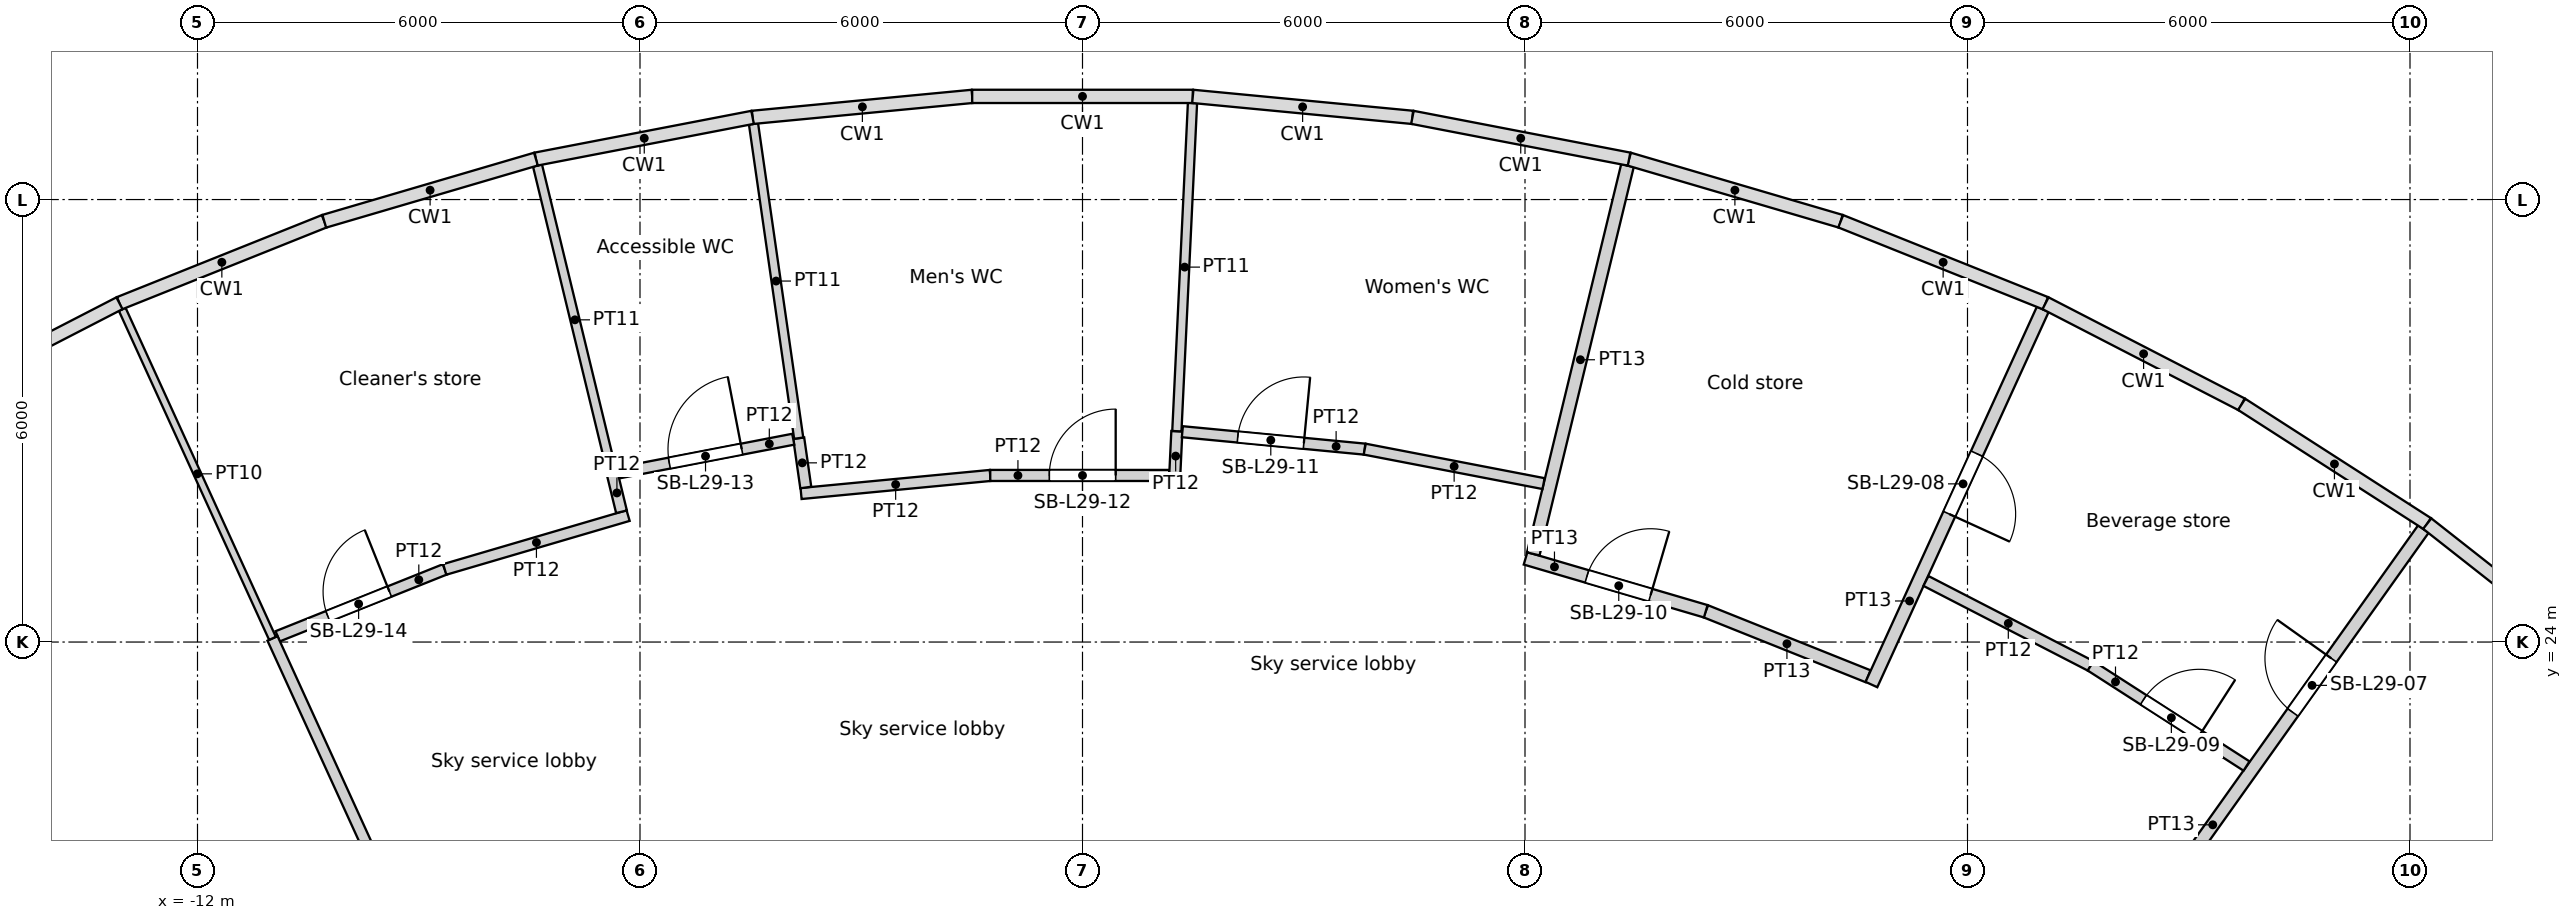
"""IFC4 building model, lengths in metres.
Left out: names, types, materials, properties, quantities, classifications, styles, units other than length and angle.
Written with IfcOpenShell. Run it as: python <this file> out.ifc"""

import sys

from ifc_helpers import new_model, si_unit, direction, frame, frame_2d, origin, origin_2d, place, context, subcontext, project, spatial, rectangle, circle, extrude, element, fill, save


model = new_model("IFC4")
c1 = context("Model", 3, precision=1e-05, world=origin(), true_north=direction((0.0, 1.0)))
c2 = subcontext(c1, "Body", "Model", "MODEL_VIEW")
j1 = project(units=[si_unit("LENGTHUNIT", "METRE"), si_unit("PLANEANGLEUNIT", "RADIAN")], contexts=[c1])
p1 = place(None, origin())
s1 = spatial("IfcSite", under=j1, at=p1, CompositionType="ELEMENT")
p2 = place(p1, origin())
s2 = spatial("IfcBuilding", under=s1, at=p2, CompositionType="ELEMENT")
p3 = place(p2, frame((0.0, 0.0, 114.6)))
s3 = spatial("IfcBuildingStorey", under=s2, at=p3, CompositionType="ELEMENT", Elevation=114.6)
for number, where, z_axis, x_axis in (
    (1, (17.561, 24.661, 0.0), (0.0, 0.0, 1.0), (1.0, 0.0, 0.0)),
    (2, (12.576, 27.539, 0.0), (0.0, 0.0, 1.0), (1.0, 0.0, 0.0)),
    (3, (7.137, 29.421, 0.0), (0.0, 0.0, 1.0), (1.0, 0.0, 0.0)),
    (4, (1.44, 30.24, 0.0), (0.0, 0.0, 1.0), (1.0, 0.0, 0.0)),
    (5, (-4.309, 29.966, 0.0), (0.0, 0.0, 1.0), (1.0, 0.0, 0.0)),
    (6, (-9.902, 28.61, 0.0), (0.0, 0.0, 1.0), (1.0, 0.0, 0.0)),
):
    element("IfcColumn", number, at=place(p3, frame(where, z_axis=z_axis, x_axis=x_axis)), inside=s3, PredefinedType="COLUMN", context=c2, shape_type="SweptSolid", body=[
        extrude(circle(Radius=0.6, at=origin_2d()), origin(), (0.0, 0.0, 1.0), 5.4),
    ])
for number, where, z_axis, x_axis in (
    (7, (9.723, 22.54, 0.0), (0.0, 0.0, 1.0), (1.0, 0.0, 0.0)),
    (8, (4.263, 24.175, 0.0), (0.0, 0.0, 1.0), (1.0, 0.0, 0.0)),
    (9, (-1.427, 24.506, 0.0), (0.0, 0.0, 1.0), (1.0, 0.0, 0.0)),
    (10, (-7.04, 23.516, 0.0), (0.0, 0.0, 1.0), (1.0, 0.0, 0.0)),
    (11, (-12.274, 21.259, 0.0), (0.0, 0.0, 1.0), (1.0, 0.0, 0.0)),
):
    element("IfcColumn", number, at=place(p3, frame(where, z_axis=z_axis, x_axis=x_axis)), inside=s3, PredefinedType="COLUMN", context=c2, shape_type="SweptSolid", body=[
        extrude(circle(Radius=0.65, at=origin_2d()), origin(), (0.0, 0.0, 1.0), 5.4),
    ])
p4 = place(p3, frame((-13.021, 28.512, 0.0), z_axis=(0.0, 0.0, 1.0), x_axis=(0.415403363215, -0.909637315544, 0.0)))
e12 = element("IfcWall", 12, at=p4, inside=s3, PredefinedType="PARTITIONING", context=c2, shape_type="SweptSolid", body=[
    extrude(rectangle(XDim=4.906, YDim=0.1, at=frame_2d((2.453, 0.0))), origin(), (0.0, 0.0, 1.0), 4.0),
])
p5 = place(p3, frame((-10.983, 24.05, 0.0), z_axis=(0.0, 0.0, 1.0), x_axis=(0.415416845748, -0.909631158365, 0.0)))
e13 = element("IfcWall", 13, at=p5, inside=s3, PredefinedType="PARTITIONING", context=c2, shape_type="SweptSolid", body=[
    extrude(rectangle(XDim=12.065, YDim=0.15, at=frame_2d((6.032, 0.0))), origin(), (0.0, 0.0, 1.0), 4.0),
])
p6 = place(p3, frame((-10.913, 24.077, 0.0), z_axis=(0.0, 0.0, 1.0), x_axis=(0.928366285294, 0.371666571445, 0.0)))
e14 = element("IfcWall", 14, at=p6, inside=s3, PredefinedType="PARTITIONING", context=c2, shape_type="SweptSolid", body=[
    extrude(rectangle(XDim=2.441, YDim=0.15, at=frame_2d((1.22, 0.0))), origin(), (0.0, 0.0, 1.0), 4.0),
])
p7 = place(p6, frame((0.733, 0.0, 0.0)))
e15 = element("IfcOpeningElement", 15, at=p7, cuts=e14, PredefinedType="OPENING", context=c2, shape_type="SweptSolid", body=[
    extrude(rectangle(XDim=0.9, YDim=2.1, at=frame_2d((0.45, 1.05))), frame((0.0, 0.075, 0.0), z_axis=(0.0, -1.0, 0.0), x_axis=(1.0, 0.0, 0.0)), (0.0, 0.0, 1.0), 0.15),
])
p8 = place(p3, frame((-7.39, 30.461, 0.0), z_axis=(0.0, 0.0, 1.0), x_axis=(0.235763969247, -0.971810347138, 0.0)))
e16 = element("IfcWall", 16, at=p8, inside=s3, PredefinedType="PARTITIONING", context=c2, shape_type="SweptSolid", body=[
    extrude(rectangle(XDim=4.305, YDim=0.125, at=frame_2d((2.152, 0.0))), origin(), (0.0, 0.0, 1.0), 4.0),
])
p9 = place(p3, frame((-6.375, 26.277, 0.0), z_axis=(0.0, 0.0, 1.0), x_axis=(0.235533543779, -0.971866220091, 0.0)))
e17 = element("IfcWall", 17, at=p9, inside=s3, PredefinedType="PARTITIONING", context=c2, shape_type="SweptSolid", body=[
    extrude(rectangle(XDim=0.526, YDim=0.15, at=frame_2d((0.263, 0.0))), origin(), (0.0, 0.0, 1.0), 4.0),
])
p10 = place(p3, frame((-6.161, 25.715, 0.0), z_axis=(0.0, 0.0, 1.0), x_axis=(-0.959492937384, -0.28173268023, 0.0)))
e18 = element("IfcWall", 18, at=p10, inside=s3, PredefinedType="PARTITIONING", context=c2, shape_type="SweptSolid", body=[
    extrude(rectangle(XDim=2.591, YDim=0.15, at=frame_2d((1.295, 0.0))), origin(), (0.0, 0.0, 1.0), 4.0),
])
p11 = place(p3, frame((-4.461, 31.025, 0.0), z_axis=(0.0, 0.0, 1.0), x_axis=(0.142294692294, -0.989824338226, 0.0)))
e19 = element("IfcWall", 19, at=p11, inside=s3, PredefinedType="PARTITIONING", context=c2, shape_type="SweptSolid", body=[
    extrude(rectangle(XDim=4.305, YDim=0.125, at=frame_2d((2.152, 0.0))), origin(), (0.0, 0.0, 1.0), 4.0),
])
p12 = place(p3, frame((-6.301, 26.292, 0.0), z_axis=(0.0, 0.0, 1.0), x_axis=(0.981932344741, 0.189232318463, 0.0)))
e20 = element("IfcWall", 20, at=p12, inside=s3, PredefinedType="PARTITIONING", context=c2, shape_type="SweptSolid", body=[
    extrude(rectangle(XDim=2.423, YDim=0.15, at=frame_2d((1.211, 0.0))), origin(), (0.0, 0.0, 1.0), 4.0),
])
p13 = place(p12, frame((0.711, 0.0, 0.0)))
e21 = element("IfcOpeningElement", 21, at=p13, cuts=e20, PredefinedType="OPENING", context=c2, shape_type="SweptSolid", body=[
    extrude(rectangle(XDim=1.0, YDim=2.1, at=frame_2d((0.5, 1.05))), frame((0.0, 0.075, 0.0), z_axis=(0.0, -1.0, 0.0), x_axis=(1.0, 0.0, 0.0)), (0.0, 0.0, 1.0), 0.15),
])
p14 = place(p3, frame((-3.848, 26.764, 0.0), z_axis=(0.0, 0.0, 1.0), x_axis=(0.142280765431, -0.989826340218, 0.0)))
e22 = element("IfcWall", 22, at=p14, inside=s3, PredefinedType="PARTITIONING", context=c2, shape_type="SweptSolid", body=[
    extrude(rectangle(XDim=0.676, YDim=0.15, at=frame_2d((0.338, 0.0))), origin(), (0.0, 0.0, 1.0), 4.0),
])
p15 = place(p3, frame((-1.251, 26.259, 0.0), z_axis=(0.0, 0.0, 1.0), x_axis=(-0.995473727837, -0.095037135829, 0.0)))
e23 = element("IfcWall", 23, at=p15, inside=s3, PredefinedType="PARTITIONING", context=c2, shape_type="SweptSolid", body=[
    extrude(rectangle(XDim=2.577, YDim=0.15, at=frame_2d((1.288, 0.0))), origin(), (0.0, 0.0, 1.0), 4.0),
])
p16 = place(p3, frame((-1.251, 26.259, 0.0), z_axis=(0.0, 0.0, 1.0), x_axis=(1.0, 0.0, 0.0)))
e24 = element("IfcWall", 24, at=p16, inside=s3, PredefinedType="PARTITIONING", context=c2, shape_type="SweptSolid", body=[
    extrude(rectangle(XDim=2.427, YDim=0.15, at=frame_2d((1.213, 0.0))), origin(), (0.0, 0.0, 1.0), 4.0),
])
p17 = place(p16, frame((0.801, 0.0, 0.0)))
e25 = element("IfcOpeningElement", 25, at=p17, cuts=e24, PredefinedType="OPENING", context=c2, shape_type="SweptSolid", body=[
    extrude(rectangle(XDim=0.9, YDim=2.1, at=frame_2d((0.45, 1.05))), frame((0.0, 0.075, 0.0), z_axis=(0.0, -1.0, 0.0), x_axis=(1.0, 0.0, 0.0)), (0.0, 0.0, 1.0), 0.15),
])
p18 = place(p3, frame((1.279, 26.859, 0.0), z_axis=(0.0, 0.0, 1.0), x_axis=(-0.047341937476, -0.998878741868, 0.0)))
e26 = element("IfcWall", 26, at=p18, inside=s3, PredefinedType="PARTITIONING", context=c2, shape_type="SweptSolid", body=[
    extrude(rectangle(XDim=0.676, YDim=0.15, at=frame_2d((0.338, 0.0))), origin(), (0.0, 0.0, 1.0), 4.0),
])
p19 = place(p3, frame((1.491, 31.309, 0.0), z_axis=(0.0, 0.0, 1.0), x_axis=(-0.047622430455, -0.99886540841, 0.0)))
e27 = element("IfcWall", 27, at=p19, inside=s3, PredefinedType="PARTITIONING", context=c2, shape_type="SweptSolid", body=[
    extrude(rectangle(XDim=4.455, YDim=0.125, at=frame_2d((2.228, 0.0))), origin(), (0.0, 0.0, 1.0), 4.0),
])
p20 = place(p3, frame((1.354, 26.852, 0.0), z_axis=(0.0, 0.0, 1.0), x_axis=(0.995473803063, -0.095036347869, 0.0)))
e28 = element("IfcWall", 28, at=p20, inside=s3, PredefinedType="PARTITIONING", context=c2, shape_type="SweptSolid", body=[
    extrude(rectangle(XDim=2.484, YDim=0.15, at=frame_2d((1.242, 0.0))), origin(), (0.0, 0.0, 1.0), 4.0),
])
p21 = place(p20, frame((0.754, 0.0, 0.0)))
e29 = element("IfcOpeningElement", 29, at=p21, cuts=e28, PredefinedType="OPENING", context=c2, shape_type="SweptSolid", body=[
    extrude(rectangle(XDim=0.9, YDim=2.1, at=frame_2d((0.45, 1.05))), frame((0.0, 0.075, 0.0), z_axis=(0.0, -1.0, 0.0), x_axis=(1.0, 0.0, 0.0)), (0.0, 0.0, 1.0), 0.15),
])
p22 = place(p3, frame((6.252, 26.148, 0.0), z_axis=(0.0, 0.0, 1.0), x_axis=(-0.981914660197, 0.189324061043, 0.0)))
e30 = element("IfcWall", 30, at=p22, inside=s3, PredefinedType="PARTITIONING", context=c2, shape_type="SweptSolid", body=[
    extrude(rectangle(XDim=2.469, YDim=0.15, at=frame_2d((1.235, 0.0))), origin(), (0.0, 0.0, 1.0), 4.0),
])
p23 = place(p3, frame((7.39, 30.461, 0.0), z_axis=(0.0, 0.0, 1.0), x_axis=(-0.235734136945, -0.971817584055, 0.0)))
e31 = element("IfcWall", 31, at=p23, inside=s3, PredefinedType="PARTITIONING", context=c2, shape_type="SweptSolid", body=[
    extrude(rectangle(XDim=5.418, YDim=0.175, at=frame_2d((2.709, 0.0))), origin(), (0.0, 0.0, 1.0), 4.0),
])
p24 = place(p3, frame((6.008, 25.135, 0.0), z_axis=(0.0, 0.0, 1.0), x_axis=(0.959475355364, -0.281792552155, 0.0)))
e32 = element("IfcWall", 32, at=p24, inside=s3, PredefinedType="PARTITIONING", context=c2, shape_type="SweptSolid", body=[
    extrude(rectangle(XDim=2.546, YDim=0.175, at=frame_2d((1.273, 0.0))), origin(), (0.0, 0.0, 1.0), 4.0),
])
p25 = place(p24, frame((0.867, 0.0, 0.0)))
e33 = element("IfcOpeningElement", 33, at=p25, cuts=e32, PredefinedType="OPENING", context=c2, shape_type="SweptSolid", body=[
    extrude(rectangle(XDim=0.9, YDim=2.1, at=frame_2d((0.45, 1.05))), frame((0.0, 0.087, 0.0), z_axis=(0.0, -1.0, 0.0), x_axis=(1.0, 0.0, 0.0)), (0.0, 0.0, 1.0), 0.175),
])
p26 = place(p3, frame((10.652, 23.536, 0.0), z_axis=(0.0, 0.0, 1.0), x_axis=(-0.928377260399, 0.371639156137, 0.0)))
e34 = element("IfcWall", 34, at=p26, inside=s3, PredefinedType="PARTITIONING", context=c2, shape_type="SweptSolid", body=[
    extrude(rectangle(XDim=2.372, YDim=0.175, at=frame_2d((1.186, 0.0))), origin(), (0.0, 0.0, 1.0), 4.0),
])
p27 = place(p3, frame((10.697, 23.424, 0.0), z_axis=(0.0, 0.0, 1.0), x_axis=(0.415406978867, 0.909635664378, 0.0)))
e35 = element("IfcWall", 35, at=p27, inside=s3, PredefinedType="PARTITIONING", context=c2, shape_type="SweptSolid", body=[
    extrude(rectangle(XDim=5.594, YDim=0.175, at=frame_2d((2.797, 0.0))), origin(), (0.0, 0.0, 1.0), 4.0),
])
p28 = place(p27, frame((2.542, 0.0, 0.0)))
e36 = element("IfcOpeningElement", 36, at=p28, cuts=e35, PredefinedType="OPENING", context=c2, shape_type="SweptSolid", body=[
    extrude(rectangle(XDim=0.9, YDim=2.1, at=frame_2d((0.45, 1.05))), frame((0.0, 0.087, 0.0), z_axis=(0.0, -1.0, 0.0), x_axis=(1.0, 0.0, 0.0)), (0.0, 0.0, 1.0), 0.175),
])
p29 = place(p3, frame((13.67, 23.677, 0.0), z_axis=(0.0, 0.0, 1.0), x_axis=(-0.8888594416, 0.458179978916, 0.0)))
e37 = element("IfcWall", 37, at=p29, inside=s3, PredefinedType="PARTITIONING", context=c2, shape_type="SweptSolid", body=[
    extrude(rectangle(XDim=2.512, YDim=0.15, at=frame_2d((1.256, 0.0))), origin(), (0.0, 0.0, 1.0), 4.0),
])
p30 = place(p3, frame((13.67, 23.677, 0.0), z_axis=(0.0, 0.0, 1.0), x_axis=(0.841232144756, -0.540674096503, 0.0)))
e38 = element("IfcWall", 38, at=p30, inside=s3, PredefinedType="PARTITIONING", context=c2, shape_type="SweptSolid", body=[
    extrude(rectangle(XDim=2.512, YDim=0.15, at=frame_2d((1.256, 0.0))), origin(), (0.0, 0.0, 1.0), 4.0),
])
p31 = place(p30, frame((0.851, 0.0, 0.0)))
e39 = element("IfcOpeningElement", 39, at=p31, cuts=e38, PredefinedType="OPENING", context=c2, shape_type="SweptSolid", body=[
    extrude(rectangle(XDim=0.9, YDim=2.1, at=frame_2d((0.45, 1.05))), frame((0.0, 0.075, 0.0), z_axis=(0.0, -1.0, 0.0), x_axis=(1.0, 0.0, 0.0)), (0.0, 0.0, 1.0), 0.15),
])
p32 = place(p3, frame((14.269, 20.038, 0.0), z_axis=(0.0, 0.0, 1.0), x_axis=(0.580039185879, 0.814588572744, 0.0)))
e40 = element("IfcWall", 40, at=p32, inside=s3, PredefinedType="PARTITIONING", context=c2, shape_type="SweptSolid", body=[
    extrude(rectangle(XDim=6.745, YDim=0.175, at=frame_2d((3.373, 0.0))), origin(), (0.0, 0.0, 1.0), 4.0),
])
p33 = place(p32, frame((3.693, 0.0, 0.0)))
e41 = element("IfcOpeningElement", 41, at=p33, cuts=e40, PredefinedType="OPENING", context=c2, shape_type="SweptSolid", body=[
    extrude(rectangle(XDim=0.9, YDim=2.1, at=frame_2d((0.45, 1.05))), frame((0.0, 0.087, 0.0), z_axis=(0.0, -1.0, 0.0), x_axis=(1.0, 0.0, 0.0)), (0.0, 0.0, 1.0), 0.175),
])
p34 = place(p33, origin())
e42 = element("IfcDoor", 42, at=p34, inside=s3, OperationType="SINGLE_SWING_RIGHT", PredefinedType="DOOR", context=c2, shape_type="SweptSolid", body=[
    extrude(rectangle(XDim=0.9, YDim=2.1, at=frame_2d((0.45, 1.05))), frame((0.0, 0.025, 0.0), z_axis=(0.0, -1.0, 0.0), x_axis=(1.0, 0.0, 0.0)), (0.0, 0.0, 1.0), 0.05),
])
fill(e41, e42)
p35 = place(p28, origin())
e43 = element("IfcDoor", 43, at=p35, inside=s3, OperationType="SINGLE_SWING_RIGHT", PredefinedType="DOOR", context=c2, shape_type="SweptSolid", body=[
    extrude(rectangle(XDim=0.9, YDim=2.1, at=frame_2d((0.45, 1.05))), frame((0.0, 0.025, 0.0), z_axis=(0.0, -1.0, 0.0), x_axis=(1.0, 0.0, 0.0)), (0.0, 0.0, 1.0), 0.05),
])
fill(e36, e43)
p36 = place(p31, origin())
e44 = element("IfcDoor", 44, at=p36, inside=s3, OperationType="SINGLE_SWING_RIGHT", PredefinedType="DOOR", context=c2, shape_type="SweptSolid", body=[
    extrude(rectangle(XDim=0.9, YDim=2.1, at=frame_2d((0.45, 1.05))), frame((0.0, 0.025, 0.0), z_axis=(0.0, -1.0, 0.0), x_axis=(1.0, 0.0, 0.0)), (0.0, 0.0, 1.0), 0.05),
])
fill(e39, e44)
p37 = place(p25, origin())
e45 = element("IfcDoor", 45, at=p37, inside=s3, OperationType="SINGLE_SWING_RIGHT", PredefinedType="DOOR", context=c2, shape_type="SweptSolid", body=[
    extrude(rectangle(XDim=0.9, YDim=2.1, at=frame_2d((0.45, 1.05))), frame((0.0, 0.025, 0.0), z_axis=(0.0, -1.0, 0.0), x_axis=(1.0, 0.0, 0.0)), (0.0, 0.0, 1.0), 0.05),
])
fill(e33, e45)
p38 = place(p21, origin())
e46 = element("IfcDoor", 46, at=p38, inside=s3, OperationType="SINGLE_SWING_RIGHT", PredefinedType="DOOR", context=c2, shape_type="SweptSolid", body=[
    extrude(rectangle(XDim=0.9, YDim=2.1, at=frame_2d((0.45, 1.05))), frame((0.0, 0.025, 0.0), z_axis=(0.0, -1.0, 0.0), x_axis=(1.0, 0.0, 0.0)), (0.0, 0.0, 1.0), 0.05),
])
fill(e29, e46)
p39 = place(p17, origin())
e47 = element("IfcDoor", 47, at=p39, inside=s3, OperationType="SINGLE_SWING_RIGHT", PredefinedType="DOOR", context=c2, shape_type="SweptSolid", body=[
    extrude(rectangle(XDim=0.9, YDim=2.1, at=frame_2d((0.45, 1.05))), frame((0.0, 0.025, 0.0), z_axis=(0.0, -1.0, 0.0), x_axis=(1.0, 0.0, 0.0)), (0.0, 0.0, 1.0), 0.05),
])
fill(e25, e47)
p40 = place(p13, origin())
e48 = element("IfcDoor", 48, at=p40, inside=s3, OperationType="SINGLE_SWING_RIGHT", PredefinedType="DOOR", context=c2, shape_type="SweptSolid", body=[
    extrude(rectangle(XDim=1.0, YDim=2.1, at=frame_2d((0.5, 1.05))), frame((0.0, 0.025, 0.0), z_axis=(0.0, -1.0, 0.0), x_axis=(1.0, 0.0, 0.0)), (0.0, 0.0, 1.0), 0.05),
])
fill(e21, e48)
p41 = place(p7, origin())
e49 = element("IfcDoor", 49, at=p41, inside=s3, OperationType="SINGLE_SWING_RIGHT", PredefinedType="DOOR", context=c2, shape_type="SweptSolid", body=[
    extrude(rectangle(XDim=0.9, YDim=2.1, at=frame_2d((0.45, 1.05))), frame((0.0, 0.025, 0.0), z_axis=(0.0, -1.0, 0.0), x_axis=(1.0, 0.0, 0.0)), (0.0, 0.0, 1.0), 0.05),
])
fill(e15, e49)
save(model, sys.argv[1])
